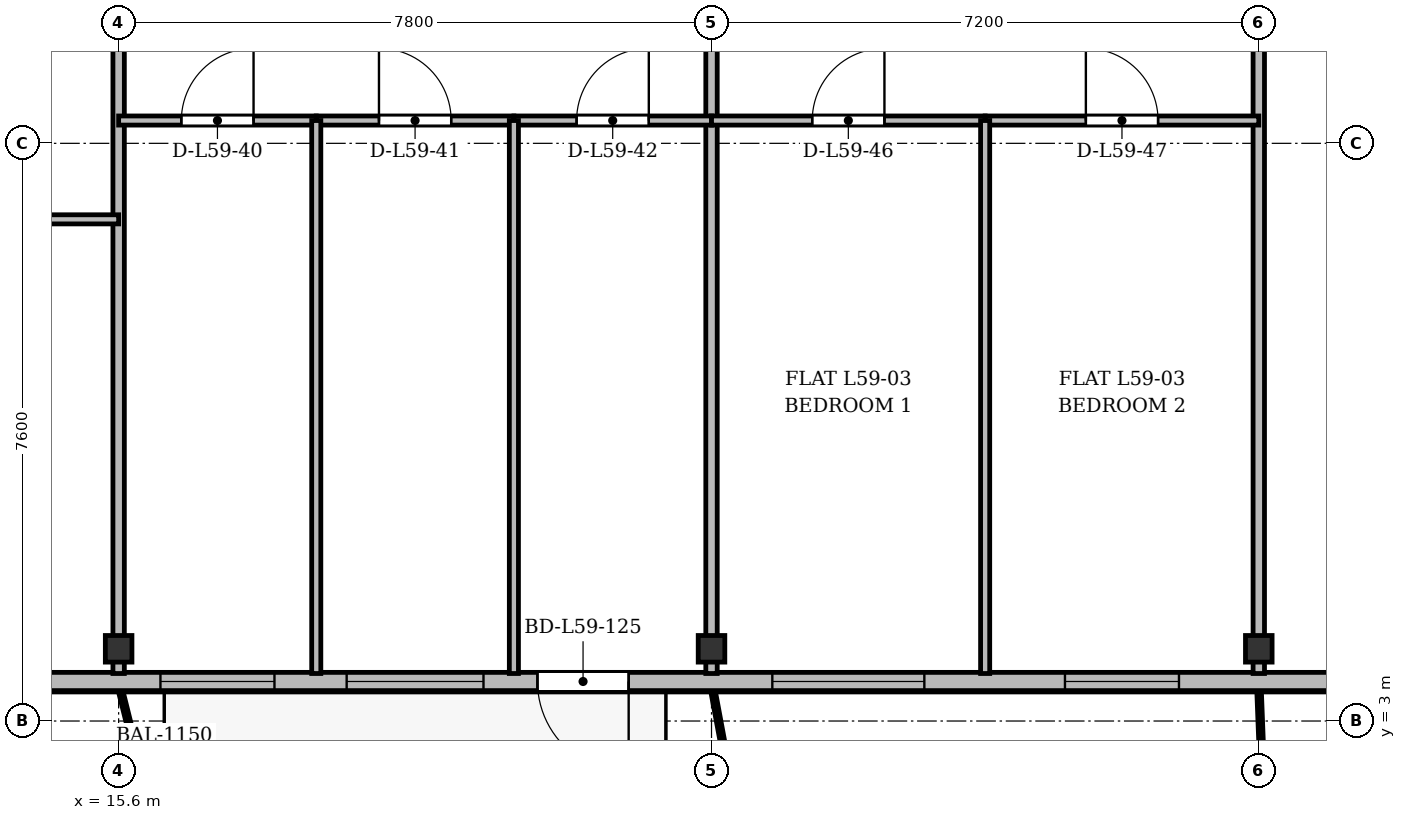
"""IFC4 building model, lengths in metres.
Left out: names, types, materials, properties, quantities, classifications, styles, units other than length and angle.
Written with IfcOpenShell. Run it as: python <this file> out.ifc"""

import sys

from ifc_helpers import new_model, si_unit, direction, frame, frame_2d, origin, origin_2d, place, context, subcontext, project, spatial, rectangle, i_section, extrude, source, transform, mapped, element, fill, save


model = new_model("IFC4")
c1 = context("Model", 3, precision=1e-05, world=origin(), true_north=direction((0.0, 1.0)))
c2 = subcontext(c1, "Body", "Model", "MODEL_VIEW")
j1 = project(units=[si_unit("LENGTHUNIT", "METRE"), si_unit("PLANEANGLEUNIT", "RADIAN")], contexts=[c1])
p1 = place(None, origin())
s1 = spatial("IfcSite", under=j1, at=p1, CompositionType="ELEMENT")
p2 = place(p1, origin())
s2 = spatial("IfcBuilding", under=s1, at=p2, CompositionType="ELEMENT")
p3 = place(p2, frame((0.0, 0.0, 226.5)))
s3 = spatial("IfcBuildingStorey", under=s2, at=p3, CompositionType="ELEMENT", Elevation=226.5)
m1 = source(origin(), c2, "Body", "SweptSolid", [
    extrude(i_section(OverallWidth=0.35, OverallDepth=0.35, WebThickness=0.018, FlangeThickness=0.028, at=origin_2d()), origin(), (0.0, 0.0, 1.0), 3.6),
])
for number, where, z_axis, x_axis in (
    (1, (15.6, 3.95, 0.0), (0.0, 0.0, 1.0), (1.0, 0.0, 0.0)),
    (2, (23.4, 3.95, 0.0), (0.0, 0.0, 1.0), (1.0, 0.0, 0.0)),
    (3, (30.6, 3.95, 0.0), (0.0, 0.0, 1.0), (1.0, 0.0, 0.0)),
):
    element("IfcColumn", number, at=place(p3, frame(where, z_axis=z_axis, x_axis=x_axis)), inside=s3, PredefinedType="COLUMN", context=c2, shape_type="MappedRepresentation", body=[
        mapped(m1, transform((0.0, 0.0, 0.0), x_axis=(1.0, 0.0, 0.0), y_axis=(0.0, 1.0, 0.0), z_axis=(0.0, 0.0, 1.0), scale=1.0)),
    ])
p4 = place(p3, frame((63.4, 3.52, 0.0), z_axis=(0.0, 0.0, 1.0), x_axis=(-1.0, 0.0, 0.0)))
e4 = element("IfcWall", 4, at=p4, inside=s3, PredefinedType="SOLIDWALL", context=c2, shape_type="SweptSolid", body=[
    extrude(rectangle(XDim=52.4, YDim=0.24, at=frame_2d((26.2, 0.0))), origin(), (0.0, 0.0, 1.0), 3.36),
])
p5 = place(p4, frame((1.52, 0.0, 0.9)))
e5 = element("IfcOpeningElement", 5, at=p5, cuts=e4, PredefinedType="OPENING", context=c2, shape_type="SweptSolid", body=[
    extrude(rectangle(XDim=1.65, YDim=1.85, at=frame_2d((0.825, 0.925))), frame((0.0, 0.13, 0.0), z_axis=(0.0, -1.0, 0.0), x_axis=(1.0, 0.0, 0.0)), (0.0, 0.0, 1.0), 0.26),
])
p6 = place(p4, frame((7.6, 0.0, 0.9)))
e6 = element("IfcOpeningElement", 6, at=p6, cuts=e4, PredefinedType="OPENING", context=c2, shape_type="SweptSolid", body=[
    extrude(rectangle(XDim=1.8, YDim=1.8, at=frame_2d((0.9, 0.9))), frame((0.0, 0.13, 0.0), z_axis=(0.0, -1.0, 0.0), x_axis=(1.0, 0.0, 0.0)), (0.0, 0.0, 1.0), 0.26),
])
p7 = place(p4, frame((13.42, 0.0, 0.0)))
e7 = element("IfcOpeningElement", 7, at=p7, cuts=e4, PredefinedType="OPENING", context=c2, shape_type="SweptSolid", body=[
    extrude(rectangle(XDim=1.2, YDim=2.2, at=frame_2d((0.6, 1.1))), frame((0.0, 0.13, 0.0), z_axis=(0.0, -1.0, 0.0), x_axis=(1.0, 0.0, 0.0)), (0.0, 0.0, 1.0), 0.26),
])
p8 = place(p4, frame((15.25, 0.0, 0.9)))
e8 = element("IfcOpeningElement", 8, at=p8, cuts=e4, PredefinedType="OPENING", context=c2, shape_type="SweptSolid", body=[
    extrude(rectangle(XDim=1.5, YDim=1.75, at=frame_2d((0.75, 0.875))), frame((0.0, 0.13, 0.0), z_axis=(0.0, -1.0, 0.0), x_axis=(1.0, 0.0, 0.0)), (0.0, 0.0, 1.0), 0.26),
])
p9 = place(p4, frame((17.4, 0.0, 0.9)))
e9 = element("IfcOpeningElement", 9, at=p9, cuts=e4, PredefinedType="OPENING", context=c2, shape_type="SweptSolid", body=[
    extrude(rectangle(XDim=2.0, YDim=1.95, at=frame_2d((1.0, 0.975))), frame((0.0, 0.13, 0.0), z_axis=(0.0, -1.0, 0.0), x_axis=(1.0, 0.0, 0.0)), (0.0, 0.0, 1.0), 0.26),
])
p10 = place(p4, frame((20.425, 0.0, 0.9)))
e10 = element("IfcOpeningElement", 10, at=p10, cuts=e4, PredefinedType="OPENING", context=c2, shape_type="SweptSolid", body=[
    extrude(rectangle(XDim=1.65, YDim=1.85, at=frame_2d((0.825, 0.925))), frame((0.0, 0.13, 0.0), z_axis=(0.0, -1.0, 0.0), x_axis=(1.0, 0.0, 0.0)), (0.0, 0.0, 1.0), 0.26),
])
p11 = place(p4, frame((23.65, 0.0, 0.9)))
e11 = element("IfcOpeningElement", 11, at=p11, cuts=e4, PredefinedType="OPENING", context=c2, shape_type="SweptSolid", body=[
    extrude(rectangle(XDim=1.8, YDim=1.8, at=frame_2d((0.9, 0.9))), frame((0.0, 0.13, 0.0), z_axis=(0.0, -1.0, 0.0), x_axis=(1.0, 0.0, 0.0)), (0.0, 0.0, 1.0), 0.26),
])
p12 = place(p4, frame((28.4, 0.0, 0.9)))
e12 = element("IfcOpeningElement", 12, at=p12, cuts=e4, PredefinedType="OPENING", context=c2, shape_type="SweptSolid", body=[
    extrude(rectangle(XDim=2.2, YDim=1.8, at=frame_2d((1.1, 0.9))), frame((0.0, 0.13, 0.0), z_axis=(0.0, -1.0, 0.0), x_axis=(1.0, 0.0, 0.0)), (0.0, 0.0, 1.0), 0.26),
])
p13 = place(p4, frame((33.85, 0.0, 0.9)))
e13 = element("IfcOpeningElement", 13, at=p13, cuts=e4, PredefinedType="OPENING", context=c2, shape_type="SweptSolid", body=[
    extrude(rectangle(XDim=1.5, YDim=1.75, at=frame_2d((0.75, 0.875))), frame((0.0, 0.13, 0.0), z_axis=(0.0, -1.0, 0.0), x_axis=(1.0, 0.0, 0.0)), (0.0, 0.0, 1.0), 0.26),
])
p14 = place(p4, frame((37.2, 0.0, 0.9)))
e14 = element("IfcOpeningElement", 14, at=p14, cuts=e4, PredefinedType="OPENING", context=c2, shape_type="SweptSolid", body=[
    extrude(rectangle(XDim=2.0, YDim=1.95, at=frame_2d((1.0, 0.975))), frame((0.0, 0.13, 0.0), z_axis=(0.0, -1.0, 0.0), x_axis=(1.0, 0.0, 0.0)), (0.0, 0.0, 1.0), 0.26),
])
p15 = place(p4, frame((41.09, 0.0, 0.0)))
e15 = element("IfcOpeningElement", 15, at=p15, cuts=e4, PredefinedType="OPENING", context=c2, shape_type="SweptSolid", body=[
    extrude(rectangle(XDim=1.2, YDim=2.2, at=frame_2d((0.6, 1.1))), frame((0.0, 0.13, 0.0), z_axis=(0.0, -1.0, 0.0), x_axis=(1.0, 0.0, 0.0)), (0.0, 0.0, 1.0), 0.26),
])
p16 = place(p4, frame((43.0, 0.0, 0.9)))
e16 = element("IfcOpeningElement", 16, at=p16, cuts=e4, PredefinedType="OPENING", context=c2, shape_type="SweptSolid", body=[
    extrude(rectangle(XDim=1.8, YDim=1.8, at=frame_2d((0.9, 0.9))), frame((0.0, 0.13, 0.0), z_axis=(0.0, -1.0, 0.0), x_axis=(1.0, 0.0, 0.0)), (0.0, 0.0, 1.0), 0.26),
])
p17 = place(p4, frame((45.75, 0.0, 0.9)))
e17 = element("IfcOpeningElement", 17, at=p17, cuts=e4, PredefinedType="OPENING", context=c2, shape_type="SweptSolid", body=[
    extrude(rectangle(XDim=1.5, YDim=1.75, at=frame_2d((0.75, 0.875))), frame((0.0, 0.13, 0.0), z_axis=(0.0, -1.0, 0.0), x_axis=(1.0, 0.0, 0.0)), (0.0, 0.0, 1.0), 0.26),
])
p18 = place(p4, frame((49.305, 0.0, 0.9)))
e18 = element("IfcOpeningElement", 18, at=p18, cuts=e4, PredefinedType="OPENING", context=c2, shape_type="SweptSolid", body=[
    extrude(rectangle(XDim=1.5, YDim=1.75, at=frame_2d((0.75, 0.875))), frame((0.0, 0.13, 0.0), z_axis=(0.0, -1.0, 0.0), x_axis=(1.0, 0.0, 0.0)), (0.0, 0.0, 1.0), 0.26),
])
for number, where, z_axis, x_axis in (
    (19, (15.6, 3.625, 0.0), (0.0, 0.0, 1.0), (0.0, 1.0, 0.0)),
    (20, (23.4, 3.625, 0.0), (0.0, 0.0, 1.0), (0.0, 1.0, 0.0)),
    (21, (30.6, 3.625, 0.0), (0.0, 0.0, 1.0), (0.0, 1.0, 0.0)),
):
    element("IfcWall", number, at=place(p3, frame(where, z_axis=z_axis, x_axis=x_axis)), inside=s3, PredefinedType="PARTITIONING", context=c2, shape_type="SweptSolid", body=[
        extrude(rectangle(XDim=27.375, YDim=0.15, at=frame_2d((13.688, 0.0))), origin(), (0.0, 0.0, 1.0), 2.86),
    ])
p19 = place(p3, frame((8.24, 9.6, 0.0), z_axis=(0.0, 0.0, 1.0), x_axis=(1.0, 0.0, 0.0)))
e22 = element("IfcWall", 22, at=p19, inside=s3, PredefinedType="PARTITIONING", context=c2, shape_type="SweptSolid", body=[
    extrude(rectangle(XDim=7.36, YDim=0.12, at=frame_2d((3.68, 0.0))), origin(), (0.0, 0.0, 1.0), 2.86),
])
p20 = place(p19, frame((3.114, 0.0, 0.0)))
e23 = element("IfcOpeningElement", 23, at=p20, cuts=e22, PredefinedType="OPENING", context=c2, shape_type="SweptSolid", body=[
    extrude(rectangle(XDim=0.95, YDim=2.15, at=frame_2d((0.475, 1.075))), frame((0.0, 0.07, 0.0), z_axis=(0.0, -1.0, 0.0), x_axis=(1.0, 0.0, 0.0)), (0.0, 0.0, 1.0), 0.14),
])
p21 = place(p3, frame((15.6, 10.9, 0.0), z_axis=(0.0, 0.0, 1.0), x_axis=(1.0, 0.0, 0.0)))
e24 = element("IfcWall", 24, at=p21, inside=s3, PredefinedType="PARTITIONING", context=c2, shape_type="SweptSolid", body=[
    extrude(rectangle(XDim=2.6, YDim=0.12, at=frame_2d((1.3, 0.0))), origin(), (0.0, 0.0, 1.0), 2.86),
])
p22 = place(p21, frame((0.825, 0.0, 0.0)))
e25 = element("IfcOpeningElement", 25, at=p22, cuts=e24, PredefinedType="OPENING", context=c2, shape_type="SweptSolid", body=[
    extrude(rectangle(XDim=0.95, YDim=2.15, at=frame_2d((0.475, 1.075))), frame((0.0, 0.07, 0.0), z_axis=(0.0, -1.0, 0.0), x_axis=(1.0, 0.0, 0.0)), (0.0, 0.0, 1.0), 0.14),
])
p23 = place(p3, frame((18.2, 10.9, 0.0), z_axis=(0.0, 0.0, 1.0), x_axis=(1.0, 0.0, 0.0)))
e26 = element("IfcWall", 26, at=p23, inside=s3, PredefinedType="PARTITIONING", context=c2, shape_type="SweptSolid", body=[
    extrude(rectangle(XDim=2.6, YDim=0.12, at=frame_2d((1.3, 0.0))), origin(), (0.0, 0.0, 1.0), 3.06),
])
p24 = place(p23, frame((0.825, 0.0, 0.0)))
e27 = element("IfcOpeningElement", 27, at=p24, cuts=e26, PredefinedType="OPENING", context=c2, shape_type="SweptSolid", body=[
    extrude(rectangle(XDim=0.95, YDim=2.15, at=frame_2d((0.475, 1.075))), frame((0.0, 0.07, 0.0), z_axis=(0.0, -1.0, 0.0), x_axis=(1.0, 0.0, 0.0)), (0.0, 0.0, 1.0), 0.14),
])
p25 = place(p3, frame((18.2, 3.625, 0.0), z_axis=(0.0, 0.0, 1.0), x_axis=(0.0, 1.0, 0.0)))
e28 = element("IfcWall", 28, at=p25, inside=s3, PredefinedType="PARTITIONING", context=c2, shape_type="SweptSolid", body=[
    extrude(rectangle(XDim=7.275, YDim=0.12, at=frame_2d((3.637, 0.0))), origin(), (0.0, 0.0, 1.0), 2.91),
])
p26 = place(p3, frame((20.8, 10.9, 0.0), z_axis=(0.0, 0.0, 1.0), x_axis=(1.0, 0.0, 0.0)))
e29 = element("IfcWall", 29, at=p26, inside=s3, PredefinedType="PARTITIONING", context=c2, shape_type="SweptSolid", body=[
    extrude(rectangle(XDim=2.6, YDim=0.12, at=frame_2d((1.3, 0.0))), origin(), (0.0, 0.0, 1.0), 2.86),
])
p27 = place(p26, frame((0.825, 0.0, 0.0)))
e30 = element("IfcOpeningElement", 30, at=p27, cuts=e29, PredefinedType="OPENING", context=c2, shape_type="SweptSolid", body=[
    extrude(rectangle(XDim=0.95, YDim=2.15, at=frame_2d((0.475, 1.075))), frame((0.0, 0.07, 0.0), z_axis=(0.0, -1.0, 0.0), x_axis=(1.0, 0.0, 0.0)), (0.0, 0.0, 1.0), 0.14),
])
p28 = place(p3, frame((20.8, 3.625, 0.0), z_axis=(0.0, 0.0, 1.0), x_axis=(0.0, 1.0, 0.0)))
e31 = element("IfcWall", 31, at=p28, inside=s3, PredefinedType="PARTITIONING", context=c2, shape_type="SweptSolid", body=[
    extrude(rectangle(XDim=7.275, YDim=0.12, at=frame_2d((3.637, 0.0))), origin(), (0.0, 0.0, 1.0), 2.91),
])
p29 = place(p3, frame((23.4, 10.9, 0.0), z_axis=(0.0, 0.0, 1.0), x_axis=(1.0, 0.0, 0.0)))
e32 = element("IfcWall", 32, at=p29, inside=s3, PredefinedType="PARTITIONING", context=c2, shape_type="SweptSolid", body=[
    extrude(rectangle(XDim=3.6, YDim=0.12, at=frame_2d((1.8, 0.0))), origin(), (0.0, 0.0, 1.0), 2.86),
])
p30 = place(p29, frame((1.325, 0.0, 0.0)))
e33 = element("IfcOpeningElement", 33, at=p30, cuts=e32, PredefinedType="OPENING", context=c2, shape_type="SweptSolid", body=[
    extrude(rectangle(XDim=0.95, YDim=2.15, at=frame_2d((0.475, 1.075))), frame((0.0, 0.07, 0.0), z_axis=(0.0, -1.0, 0.0), x_axis=(1.0, 0.0, 0.0)), (0.0, 0.0, 1.0), 0.14),
])
p31 = place(p3, frame((27.0, 10.9, 0.0), z_axis=(0.0, 0.0, 1.0), x_axis=(1.0, 0.0, 0.0)))
e34 = element("IfcWall", 34, at=p31, inside=s3, PredefinedType="PARTITIONING", context=c2, shape_type="SweptSolid", body=[
    extrude(rectangle(XDim=3.6, YDim=0.12, at=frame_2d((1.8, 0.0))), origin(), (0.0, 0.0, 1.0), 2.86),
])
p32 = place(p31, frame((1.325, 0.0, 0.0)))
e35 = element("IfcOpeningElement", 35, at=p32, cuts=e34, PredefinedType="OPENING", context=c2, shape_type="SweptSolid", body=[
    extrude(rectangle(XDim=0.95, YDim=2.15, at=frame_2d((0.475, 1.075))), frame((0.0, 0.07, 0.0), z_axis=(0.0, -1.0, 0.0), x_axis=(1.0, 0.0, 0.0)), (0.0, 0.0, 1.0), 0.14),
])
p33 = place(p3, frame((27.0, 3.625, 0.0), z_axis=(0.0, 0.0, 1.0), x_axis=(0.0, 1.0, 0.0)))
e36 = element("IfcWall", 36, at=p33, inside=s3, PredefinedType="PARTITIONING", context=c2, shape_type="SweptSolid", body=[
    extrude(rectangle(XDim=7.275, YDim=0.12, at=frame_2d((3.637, 0.0))), origin(), (0.0, 0.0, 1.0), 2.91),
])
m2 = source(origin(), c2, "Body", "SweptSolid", [
    extrude(rectangle(XDim=1.5, YDim=1.75, at=frame_2d((0.75, 0.875))), frame((0.0, 0.03, 0.0), z_axis=(0.0, -1.0, 0.0), x_axis=(1.0, 0.0, 0.0)), (0.0, 0.0, 1.0), 0.06),
])
p34 = place(p13, origin())
e37 = element("IfcWindow", 37, at=p34, inside=s3, PartitioningType="SINGLE_PANEL", PredefinedType="WINDOW", context=c2, shape_type="MappedRepresentation", body=[
    mapped(m2, transform((0.0, 0.0, 0.0), x_axis=(1.0, 0.0, 0.0), y_axis=(0.0, 1.0, 0.0), z_axis=(0.0, 0.0, 1.0), scale=1.0)),
])
fill(e13, e37)
m3 = source(origin(), c2, "Body", "SweptSolid", [
    extrude(rectangle(XDim=2.0, YDim=1.95, at=frame_2d((1.0, 0.975))), frame((0.0, 0.03, 0.0), z_axis=(0.0, -1.0, 0.0), x_axis=(1.0, 0.0, 0.0)), (0.0, 0.0, 1.0), 0.06),
])
p35 = place(p14, origin())
e38 = element("IfcWindow", 38, at=p35, inside=s3, PartitioningType="SINGLE_PANEL", PredefinedType="WINDOW", context=c2, shape_type="MappedRepresentation", body=[
    mapped(m3, transform((0.0, 0.0, 0.0), x_axis=(1.0, 0.0, 0.0), y_axis=(0.0, 1.0, 0.0), z_axis=(0.0, 0.0, 1.0), scale=1.0)),
])
fill(e14, e38)
m4 = source(origin(), c2, "Body", "SweptSolid", [
    extrude(rectangle(XDim=1.2, YDim=2.2, at=frame_2d((0.6, 1.1))), frame((0.0, 0.025, 0.0), z_axis=(0.0, -1.0, 0.0), x_axis=(1.0, 0.0, 0.0)), (0.0, 0.0, 1.0), 0.05),
])
p36 = place(p15, origin())
e39 = element("IfcDoor", 39, at=p36, inside=s3, OperationType="SINGLE_SWING_LEFT", PredefinedType="DOOR", context=c2, shape_type="MappedRepresentation", body=[
    mapped(m4, transform((0.0, 0.0, 0.0), x_axis=(1.0, 0.0, 0.0), y_axis=(0.0, 1.0, 0.0), z_axis=(0.0, 0.0, 1.0), scale=1.0)),
])
fill(e15, e39)
m5 = source(origin(), c2, "Body", "SweptSolid", [
    extrude(rectangle(XDim=1.8, YDim=1.8, at=frame_2d((0.9, 0.9))), frame((0.0, 0.03, 0.0), z_axis=(0.0, -1.0, 0.0), x_axis=(1.0, 0.0, 0.0)), (0.0, 0.0, 1.0), 0.06),
])
p37 = place(p16, origin())
e40 = element("IfcWindow", 40, at=p37, inside=s3, PartitioningType="SINGLE_PANEL", PredefinedType="WINDOW", context=c2, shape_type="MappedRepresentation", body=[
    mapped(m5, transform((0.0, 0.0, 0.0), x_axis=(1.0, 0.0, 0.0), y_axis=(0.0, 1.0, 0.0), z_axis=(0.0, 0.0, 1.0), scale=1.0)),
])
fill(e16, e40)
p38 = place(p17, origin())
e41 = element("IfcWindow", 41, at=p38, inside=s3, PartitioningType="SINGLE_PANEL", PredefinedType="WINDOW", context=c2, shape_type="MappedRepresentation", body=[
    mapped(m2, transform((0.0, 0.0, 0.0), x_axis=(1.0, 0.0, 0.0), y_axis=(0.0, 1.0, 0.0), z_axis=(0.0, 0.0, 1.0), scale=1.0)),
])
fill(e17, e41)
m6 = source(origin(), c2, "Body", "SweptSolid", [
    extrude(rectangle(XDim=0.95, YDim=2.15, at=frame_2d((0.475, 1.075))), frame((0.0, 0.025, 0.0), z_axis=(0.0, -1.0, 0.0), x_axis=(1.0, 0.0, 0.0)), (0.0, 0.0, 1.0), 0.05),
])
p39 = place(p22, origin())
e42 = element("IfcDoor", 42, at=p39, inside=s3, OperationType="SINGLE_SWING_RIGHT", PredefinedType="DOOR", context=c2, shape_type="MappedRepresentation", body=[
    mapped(m6, transform((0.0, 0.0, 0.0), x_axis=(1.0, 0.0, 0.0), y_axis=(0.0, 1.0, 0.0), z_axis=(0.0, 0.0, 1.0), scale=1.0)),
])
fill(e25, e42)
p40 = place(p24, origin())
e43 = element("IfcDoor", 43, at=p40, inside=s3, OperationType="SINGLE_SWING_LEFT", PredefinedType="DOOR", context=c2, shape_type="MappedRepresentation", body=[
    mapped(m6, transform((0.0, 0.0, 0.0), x_axis=(1.0, 0.0, 0.0), y_axis=(0.0, 1.0, 0.0), z_axis=(0.0, 0.0, 1.0), scale=1.0)),
])
fill(e27, e43)
p41 = place(p27, origin())
e44 = element("IfcDoor", 44, at=p41, inside=s3, OperationType="SINGLE_SWING_RIGHT", PredefinedType="DOOR", context=c2, shape_type="MappedRepresentation", body=[
    mapped(m6, transform((0.0, 0.0, 0.0), x_axis=(1.0, 0.0, 0.0), y_axis=(0.0, 1.0, 0.0), z_axis=(0.0, 0.0, 1.0), scale=1.0)),
])
fill(e30, e44)
p42 = place(p30, origin())
e45 = element("IfcDoor", 45, at=p42, inside=s3, OperationType="SINGLE_SWING_RIGHT", PredefinedType="DOOR", context=c2, shape_type="MappedRepresentation", body=[
    mapped(m6, transform((0.0, 0.0, 0.0), x_axis=(1.0, 0.0, 0.0), y_axis=(0.0, 1.0, 0.0), z_axis=(0.0, 0.0, 1.0), scale=1.0)),
])
fill(e33, e45)
p43 = place(p32, origin())
e46 = element("IfcDoor", 46, at=p43, inside=s3, OperationType="SINGLE_SWING_LEFT", PredefinedType="DOOR", context=c2, shape_type="MappedRepresentation", body=[
    mapped(m6, transform((0.0, 0.0, 0.0), x_axis=(1.0, 0.0, 0.0), y_axis=(0.0, 1.0, 0.0), z_axis=(0.0, 0.0, 1.0), scale=1.0)),
])
fill(e35, e46)
save(model, sys.argv[1])
